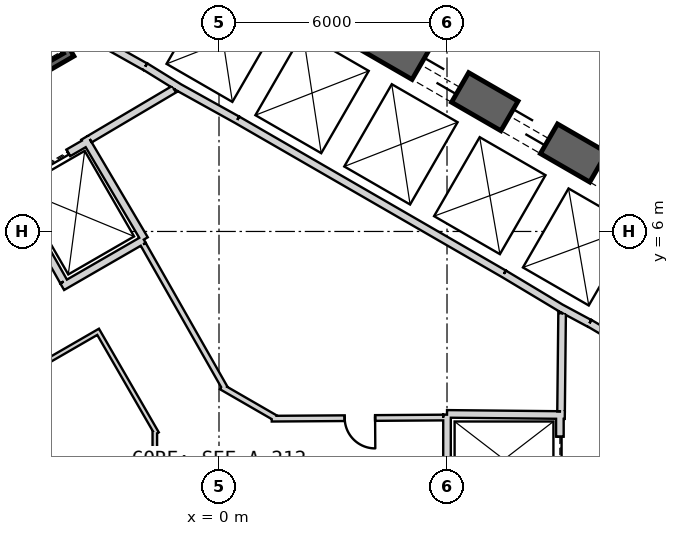
"""IFC4 building model, lengths in metres.
Left out: names, types, materials, properties, quantities, classifications, styles, units other than length and angle.
Written with IfcOpenShell. Run it as: python <this file> out.ifc"""

import sys

from ifc_helpers import new_model, si_unit, direction, frame, frame_2d, origin, place, context, subcontext, project, spatial, rectangle, extrude, element, fill, save


model = new_model("IFC4")
c1 = context("Model", 3, precision=1e-05, world=origin(), true_north=direction((0.0, 1.0)))
c2 = subcontext(c1, "Body", "Model", "MODEL_VIEW")
j1 = project(units=[si_unit("LENGTHUNIT", "METRE"), si_unit("PLANEANGLEUNIT", "RADIAN")], contexts=[c1])
p1 = place(None, origin())
s1 = spatial("IfcSite", under=j1, at=p1, CompositionType="ELEMENT")
p2 = place(p1, origin())
s2 = spatial("IfcBuilding", under=s1, at=p2, CompositionType="ELEMENT")
p3 = place(p2, frame((0.0, 0.0, 70.1)))
s3 = spatial("IfcBuildingStorey", under=s2, at=p3, CompositionType="ELEMENT", Elevation=70.1)
p4 = place(p3, frame((19.475, 2.208, 0.0), z_axis=(0.0, 0.0, 1.0), x_axis=(-0.866028369851, 0.499994862586, 0.0)))
e1 = element("IfcWall", 1, at=p4, inside=s3, PredefinedType="SHEAR", context=c2, shape_type="SweptSolid", body=[
    extrude(rectangle(XDim=31.523, YDim=0.9, at=frame_2d((15.762, 0.0))), origin(), (0.0, 0.0, 1.0), 4.1),
])
p5 = place(p4, frame((7.062, 0.0, 0.0)))
e2 = element("IfcOpeningElement", 2, at=p5, cuts=e1, PredefinedType="OPENING", context=c2, shape_type="SweptSolid", body=[
    extrude(rectangle(XDim=1.2, YDim=2.4, at=frame_2d((0.6, 1.2))), frame((0.0, 0.46, 0.0), z_axis=(0.0, -1.0, 0.0), x_axis=(1.0, 0.0, 0.0)), (0.0, 0.0, 1.0), 0.92),
])
p6 = place(p4, frame((9.762, 0.0, 0.0)))
e3 = element("IfcOpeningElement", 3, at=p6, cuts=e1, PredefinedType="OPENING", context=c2, shape_type="SweptSolid", body=[
    extrude(rectangle(XDim=1.2, YDim=2.4, at=frame_2d((0.6, 1.2))), frame((0.0, 0.46, 0.0), z_axis=(0.0, -1.0, 0.0), x_axis=(1.0, 0.0, 0.0)), (0.0, 0.0, 1.0), 0.92),
])
p7 = place(p4, frame((12.462, 0.0, 0.0)))
e4 = element("IfcOpeningElement", 4, at=p7, cuts=e1, PredefinedType="OPENING", context=c2, shape_type="SweptSolid", body=[
    extrude(rectangle(XDim=1.2, YDim=2.4, at=frame_2d((0.6, 1.2))), frame((0.0, 0.46, 0.0), z_axis=(0.0, -1.0, 0.0), x_axis=(1.0, 0.0, 0.0)), (0.0, 0.0, 1.0), 0.92),
])
p8 = place(p4, frame((15.162, 0.0, 0.0)))
e5 = element("IfcOpeningElement", 5, at=p8, cuts=e1, PredefinedType="OPENING", context=c2, shape_type="SweptSolid", body=[
    extrude(rectangle(XDim=1.2, YDim=2.4, at=frame_2d((0.6, 1.2))), frame((0.0, 0.46, 0.0), z_axis=(0.0, -1.0, 0.0), x_axis=(1.0, 0.0, 0.0)), (0.0, 0.0, 1.0), 0.92),
])
p9 = place(p4, frame((17.862, 0.0, 0.0)))
e6 = element("IfcOpeningElement", 6, at=p9, cuts=e1, PredefinedType="OPENING", context=c2, shape_type="SweptSolid", body=[
    extrude(rectangle(XDim=1.2, YDim=2.4, at=frame_2d((0.6, 1.2))), frame((0.0, 0.46, 0.0), z_axis=(0.0, -1.0, 0.0), x_axis=(1.0, 0.0, 0.0)), (0.0, 0.0, 1.0), 0.92),
])
p10 = place(p4, frame((20.562, 0.0, 0.0)))
e7 = element("IfcOpeningElement", 7, at=p10, cuts=e1, PredefinedType="OPENING", context=c2, shape_type="SweptSolid", body=[
    extrude(rectangle(XDim=1.2, YDim=2.4, at=frame_2d((0.6, 1.2))), frame((0.0, 0.46, 0.0), z_axis=(0.0, -1.0, 0.0), x_axis=(1.0, 0.0, 0.0)), (0.0, 0.0, 1.0), 0.92),
])
p11 = place(p4, frame((23.262, 0.0, 0.0)))
e8 = element("IfcOpeningElement", 8, at=p11, cuts=e1, PredefinedType="OPENING", context=c2, shape_type="SweptSolid", body=[
    extrude(rectangle(XDim=1.2, YDim=2.4, at=frame_2d((0.6, 1.2))), frame((0.0, 0.46, 0.0), z_axis=(0.0, -1.0, 0.0), x_axis=(1.0, 0.0, 0.0)), (0.0, 0.0, 1.0), 0.92),
])
p12 = place(p4, frame((3.612, 0.0, 0.0)))
e9 = element("IfcOpeningElement", 9, at=p12, cuts=e1, PredefinedType="OPENING", context=c2, shape_type="SweptSolid", body=[
    extrude(rectangle(XDim=1.2, YDim=2.4, at=frame_2d((0.6, 1.2))), frame((0.0, 0.46, 0.0), z_axis=(0.0, -1.0, 0.0), x_axis=(1.0, 0.0, 0.0)), (0.0, 0.0, 1.0), 0.92),
])
p13 = place(p4, frame((26.712, 0.0, 0.0)))
e10 = element("IfcOpeningElement", 10, at=p13, cuts=e1, PredefinedType="OPENING", context=c2, shape_type="SweptSolid", body=[
    extrude(rectangle(XDim=1.2, YDim=2.4, at=frame_2d((0.6, 1.2))), frame((0.0, 0.46, 0.0), z_axis=(0.0, -1.0, 0.0), x_axis=(1.0, 0.0, 0.0)), (0.0, 0.0, 1.0), 0.92),
])
p14 = place(p3, frame((7.497, 4.886, 0.0), z_axis=(0.0, 0.0, 1.0), x_axis=(-0.866030989016, 0.499990325971, 0.0)))
e11 = element("IfcWall", 11, at=p14, inside=s3, PredefinedType="PLUMBINGWALL", context=c2, shape_type="SweptSolid", body=[
    extrude(rectangle(XDim=8.1, YDim=0.2, at=frame_2d((4.05, 0.0))), origin(), (0.0, 0.0, 1.0), 3.8),
])
p15 = place(p3, frame((12.073, 2.211, 0.0), z_axis=(0.0, 0.0, 1.0), x_axis=(-0.860438357912, 0.509554542943, 0.0)))
e12 = element("IfcWall", 12, at=p15, inside=s3, PredefinedType="PLUMBINGWALL", context=c2, shape_type="SweptSolid", body=[
    extrude(rectangle(XDim=2.7, YDim=0.2, at=frame_2d((1.35, 0.0))), origin(), (0.0, 0.0, 1.0), 3.8),
])
p16 = place(p3, frame((9.748, 3.583, 0.0), z_axis=(0.0, 0.0, 1.0), x_axis=(-0.880917147855, 0.473270513147, 0.0)))
e13 = element("IfcWall", 13, at=p16, inside=s3, PredefinedType="PLUMBINGWALL", context=c2, shape_type="SweptSolid", body=[
    extrude(rectangle(XDim=0.878, YDim=0.2, at=frame_2d((0.439, 0.0))), origin(), (0.0, 0.0, 1.0), 3.8),
])
p17 = place(p3, frame((9.079, 3.937, 0.0), z_axis=(0.0, 0.0, 1.0), x_axis=(-0.857516281273, 0.51445682749, 0.0)))
e14 = element("IfcWall", 14, at=p17, inside=s3, PredefinedType="PLUMBINGWALL", context=c2, shape_type="SweptSolid", body=[
    extrude(rectangle(XDim=1.845, YDim=0.2, at=frame_2d((0.922, 0.0))), origin(), (0.0, 0.0, 1.0), 3.8),
])
p18 = place(p3, frame((-1.941, 10.339, 0.0), z_axis=(0.0, 0.0, 1.0), x_axis=(0.850216889117, -0.526432561171, 0.0)))
e15 = element("IfcWall", 15, at=p18, inside=s3, PredefinedType="PLUMBINGWALL", context=c2, shape_type="SweptSolid", body=[
    extrude(rectangle(XDim=1.078, YDim=0.2, at=frame_2d((0.539, 0.0))), origin(), (0.0, 0.0, 1.0), 3.8),
])
p19 = place(p3, frame((0.483, 8.936, 0.0), z_axis=(0.0, 0.0, 1.0), x_axis=(-0.874269620932, 0.485440655401, 0.0)))
e16 = element("IfcWall", 16, at=p19, inside=s3, PredefinedType="PLUMBINGWALL", context=c2, shape_type="SweptSolid", body=[
    extrude(rectangle(XDim=1.845, YDim=0.2, at=frame_2d((0.922, 0.0))), origin(), (0.0, 0.0, 1.0), 3.8),
])
p20 = place(p3, frame((-4.296, 11.659, 0.0), z_axis=(0.0, 0.0, 1.0), x_axis=(0.871534483978, -0.490334215854, 0.0)))
e17 = element("IfcWall", 17, at=p20, inside=s3, PredefinedType="PLUMBINGWALL", context=c2, shape_type="SweptSolid", body=[
    extrude(rectangle(XDim=2.7, YDim=0.2, at=frame_2d((1.35, 0.0))), origin(), (0.0, 0.0, 1.0), 3.8),
])
p21 = place(p3, frame((8.97, 1.2, 0.0), z_axis=(0.0, 0.0, 1.0), x_axis=(0.0, -1.0, 0.0)))
e18 = element("IfcWall", 18, at=p21, inside=s3, PredefinedType="PLUMBINGWALL", context=c2, shape_type="SweptSolid", body=[
    extrude(rectangle(XDim=2.4, YDim=0.2, at=frame_2d((1.2, 0.0))), origin(), (0.0, 0.0, 1.0), 3.8),
])
p22 = place(p21, frame((0.6, 0.0, 0.0)))
e19 = element("IfcOpeningElement", 19, at=p22, cuts=e18, PredefinedType="OPENING", context=c2, shape_type="SweptSolid", body=[
    extrude(rectangle(XDim=1.2, YDim=2.4, at=frame_2d((0.6, 1.2))), frame((0.0, 0.11, 0.0), z_axis=(0.0, -1.0, 0.0), x_axis=(1.0, 0.0, 0.0)), (0.0, 0.0, 1.0), 0.22),
])
p23 = place(p3, frame((6.0, 1.2, 0.0), z_axis=(0.0, 0.0, 1.0), x_axis=(0.999949988, -0.010001074852, 0.0)))
e20 = element("IfcWall", 20, at=p23, inside=s3, PredefinedType="PLUMBINGWALL", context=c2, shape_type="SweptSolid", body=[
    extrude(rectangle(XDim=3.1, YDim=0.2, at=frame_2d((1.55, 0.0))), origin(), (0.0, 0.0, 1.0), 3.8),
])
p24 = place(p3, frame((6.0, -1.1, 0.0), z_axis=(0.0, 0.0, 1.0), x_axis=(0.0, 1.0, 0.0)))
e21 = element("IfcWall", 21, at=p24, inside=s3, PredefinedType="PLUMBINGWALL", context=c2, shape_type="SweptSolid", body=[
    extrude(rectangle(XDim=2.28, YDim=0.2, at=frame_2d((1.14, 0.0))), origin(), (0.0, 0.0, 1.0), 3.8),
])
p25 = place(p3, frame((-7.854, 17.405, -0.3), z_axis=(0.0, 0.0, 1.0), x_axis=(0.499997992926, -0.866026562566, 0.0)))
e22 = element("IfcWall", 22, at=p25, inside=s3, PredefinedType="SHEAR", context=c2, shape_type="SweptSolid", body=[
    extrude(rectangle(XDim=7.9, YDim=0.2, at=frame_2d((3.95, 0.0))), origin(), (0.0, 0.0, 1.0), 4.1),
])
p26 = place(p3, frame((-7.159, 8.8, -0.3), z_axis=(0.0, 0.0, 1.0), x_axis=(0.866047807691, 0.499961193289, 0.0)))
e23 = element("IfcWall", 23, at=p26, inside=s3, PredefinedType="SHEAR", context=c2, shape_type="SweptSolid", body=[
    extrude(rectangle(XDim=3.6, YDim=0.2, at=frame_2d((1.8, 0.0))), origin(), (0.0, 0.0, 1.0), 4.1),
])
p27 = place(p26, frame((1.25, 0.0, 0.3)))
e24 = element("IfcOpeningElement", 24, at=p27, cuts=e23, PredefinedType="OPENING", context=c2, shape_type="SweptSolid", body=[
    extrude(rectangle(XDim=1.1, YDim=2.1, at=frame_2d((0.55, 1.05))), frame((0.0, 0.11, 0.0), z_axis=(0.0, -1.0, 0.0), x_axis=(1.0, 0.0, 0.0)), (0.0, 0.0, 1.0), 0.22),
])
p28 = place(p3, frame((-5.524, 7.168, 0.0), z_axis=(0.0, 0.0, 1.0), x_axis=(0.866024647952, 0.500001309137, 0.0)))
e25 = element("IfcWall", 25, at=p28, inside=s3, PredefinedType="PLUMBINGWALL", context=c2, shape_type="SweptSolid", body=[
    extrude(rectangle(XDim=2.4, YDim=0.2, at=frame_2d((1.2, 0.0))), origin(), (0.0, 0.0, 1.0), 3.8),
])
p29 = place(p28, frame((0.6, 0.0, 0.0)))
e26 = element("IfcOpeningElement", 26, at=p29, cuts=e25, PredefinedType="OPENING", context=c2, shape_type="SweptSolid", body=[
    extrude(rectangle(XDim=1.2, YDim=2.4, at=frame_2d((0.6, 1.2))), frame((0.0, 0.11, 0.0), z_axis=(0.0, -1.0, 0.0), x_axis=(1.0, 0.0, 0.0)), (0.0, 0.0, 1.0), 0.22),
])
p30 = place(p3, frame((-3.538, 8.465, 0.0), z_axis=(0.0, 0.0, 1.0), x_axis=(0.508647062354, -0.860975125052, 0.0)))
e27 = element("IfcWall", 27, at=p30, inside=s3, PredefinedType="PLUMBINGWALL", context=c2, shape_type="SweptSolid", body=[
    extrude(rectangle(XDim=3.1, YDim=0.2, at=frame_2d((1.55, 0.0))), origin(), (0.0, 0.0, 1.0), 3.8),
])
p31 = place(p3, frame((-1.979, 5.786, 0.0), z_axis=(0.0, 0.0, 1.0), x_axis=(-0.866016689309, -0.500015093611, 0.0)))
e28 = element("IfcWall", 28, at=p31, inside=s3, PredefinedType="PLUMBINGWALL", context=c2, shape_type="SweptSolid", body=[
    extrude(rectangle(XDim=2.479, YDim=0.2, at=frame_2d((1.24, 0.0))), origin(), (0.0, 0.0, 1.0), 3.8),
])
p32 = place(p3, frame((-5.562, 7.296, 0.0), z_axis=(0.0, 0.0, 1.0), x_axis=(0.49134651263, -0.870964180966, 0.0)))
e29 = element("IfcWall", 29, at=p32, inside=s3, PredefinedType="PLUMBINGWALL", context=c2, shape_type="SweptSolid", body=[
    extrude(rectangle(XDim=3.0, YDim=0.2, at=frame_2d((1.5, 0.0))), origin(), (0.0, 0.0, 1.0), 3.8),
])
p33 = place(p3, frame((9.001, 1.27, 0.0), z_axis=(0.0, 0.0, 1.0), x_axis=(0.010784614026, 0.999941844359, 0.0)))
e30 = element("IfcWall", 30, at=p33, inside=s3, PredefinedType="PARTITIONING", context=c2, shape_type="SweptSolid", body=[
    extrude(rectangle(XDim=2.581, YDim=0.2, at=frame_2d((1.291, 0.0))), origin(), (0.0, 0.0, 1.0), 3.8),
])
p34 = place(p3, frame((-1.18, 9.744, 0.0), z_axis=(0.0, 0.0, 1.0), x_axis=(-0.860615607571, -0.509255118781, 0.0)))
e31 = element("IfcWall", 31, at=p34, inside=s3, PredefinedType="PARTITIONING", context=c2, shape_type="SweptSolid", body=[
    extrude(rectangle(XDim=2.581, YDim=0.2, at=frame_2d((1.29, 0.0))), origin(), (0.0, 0.0, 1.0), 3.8),
])
p35 = place(p3, frame((1.388, 1.074, 0.0), z_axis=(0.0, 0.0, 1.0), x_axis=(0.99997856967, 0.006546770205, 0.0)))
e32 = element("IfcWall", 32, at=p35, inside=s3, PredefinedType="PLUMBINGWALL", context=c2, shape_type="SweptSolid", body=[
    extrude(rectangle(XDim=4.512, YDim=0.15, at=frame_2d((2.256, 0.0))), origin(), (0.0, 0.0, 1.0), 3.8),
])
p36 = place(p35, frame((1.92, 0.0, 0.0)))
e33 = element("IfcOpeningElement", 33, at=p36, cuts=e32, PredefinedType="OPENING", context=c2, shape_type="SweptSolid", body=[
    extrude(rectangle(XDim=0.8, YDim=2.1, at=frame_2d((0.4, 1.05))), frame((0.0, 0.085, 0.0), z_axis=(0.0, -1.0, 0.0), x_axis=(1.0, 0.0, 0.0)), (0.0, 0.0, 1.0), 0.17),
])
p37 = place(p3, frame((0.062, 1.914, 0.0), z_axis=(0.0, 0.0, 1.0), x_axis=(0.866018462269, -0.500012022864, 0.0)))
e34 = element("IfcWall", 34, at=p37, inside=s3, PredefinedType="PLUMBINGWALL", context=c2, shape_type="SweptSolid", body=[
    extrude(rectangle(XDim=1.654, YDim=0.15, at=frame_2d((0.827, 0.0))), origin(), (0.0, 0.0, 1.0), 3.8),
])
p38 = place(p3, frame((-1.994, 5.661, 0.0), z_axis=(0.0, 0.0, 1.0), x_axis=(0.494341211302, -0.869267948798, 0.0)))
e35 = element("IfcWall", 35, at=p38, inside=s3, PredefinedType="PLUMBINGWALL", context=c2, shape_type="SweptSolid", body=[
    extrude(rectangle(XDim=4.361, YDim=0.15, at=frame_2d((2.18, 0.0))), origin(), (0.0, 0.0, 1.0), 3.8),
])
p39 = place(p3, frame((-3.129, 3.39, 0.0), z_axis=(0.0, 0.0, 1.0), x_axis=(-0.866053003207, -0.499952193351, 0.0)))
e36 = element("IfcWall", 36, at=p39, inside=s3, PredefinedType="PARTITIONING", context=c2, shape_type="SweptSolid", body=[
    extrude(rectangle(XDim=1.625, YDim=0.12, at=frame_2d((0.812, 0.0))), origin(), (0.0, 0.0, 1.0), 3.8),
])
p40 = place(p3, frame((-1.637, 0.685, 0.0), z_axis=(0.0, 0.0, 1.0), x_axis=(-0.500006252586, 0.866021793822, 0.0)))
e37 = element("IfcWall", 37, at=p40, inside=s3, PredefinedType="PARTITIONING", context=c2, shape_type="SweptSolid", body=[
    extrude(rectangle(XDim=3.028, YDim=0.12, at=frame_2d((1.514, 0.0))), origin(), (0.0, 0.0, 1.0), 3.8),
])
p41 = place(p3, frame((-1.689, -0.879, 0.0), z_axis=(0.0, 0.0, 1.0), x_axis=(0.0, 1.0, 0.0)))
e38 = element("IfcWall", 38, at=p41, inside=s3, PredefinedType="PARTITIONING", context=c2, shape_type="SweptSolid", body=[
    extrude(rectangle(XDim=1.635, YDim=0.12, at=frame_2d((0.818, 0.0))), origin(), (0.0, 0.0, 1.0), 3.8),
])
p42 = place(p3, frame((17.023, 9.224, 0.0), z_axis=(0.0, 0.0, 1.0), x_axis=(-0.866024925705, 0.500000828058, 0.0)))
e39 = element("IfcWall", 39, at=p42, inside=s3, PredefinedType="PARTITIONING", context=c2, shape_type="SweptSolid", body=[
    extrude(rectangle(XDim=26.647, YDim=0.2, at=frame_2d((13.323, 0.0))), origin(), (0.0, 0.0, 1.0), 2.98),
])
p43 = place(p42, frame((12.823, 0.0, 0.0)))
e40 = element("IfcOpeningElement", 40, at=p43, cuts=e39, PredefinedType="OPENING", context=c2, shape_type="SweptSolid", body=[
    extrude(rectangle(XDim=1.0, YDim=2.1, at=frame_2d((0.5, 1.05))), frame((0.0, 0.11, 0.0), z_axis=(0.0, -1.0, 0.0), x_axis=(1.0, 0.0, 0.0)), (0.0, 0.0, 1.0), 0.22),
])
p44 = place(p22, origin())
e41 = element("IfcDoor", 41, at=p44, inside=s3, OperationType="SLIDING_TO_LEFT", PredefinedType="USERDEFINED", context=c2, shape_type="SweptSolid", body=[
    extrude(rectangle(XDim=1.2, YDim=2.4, at=frame_2d((0.6, 1.2))), frame((0.0, 0.025, 0.0), z_axis=(0.0, -1.0, 0.0), x_axis=(1.0, 0.0, 0.0)), (0.0, 0.0, 1.0), 0.05),
])
fill(e19, e41)
p45 = place(p29, origin())
e42 = element("IfcDoor", 42, at=p45, inside=s3, OperationType="SLIDING_TO_LEFT", PredefinedType="USERDEFINED", context=c2, shape_type="SweptSolid", body=[
    extrude(rectangle(XDim=1.2, YDim=2.4, at=frame_2d((0.6, 1.2))), frame((0.0, 0.025, 0.0), z_axis=(0.0, -1.0, 0.0), x_axis=(1.0, 0.0, 0.0)), (0.0, 0.0, 1.0), 0.05),
])
fill(e26, e42)
p46 = place(p36, origin())
e43 = element("IfcDoor", 43, at=p46, inside=s3, OperationType="SINGLE_SWING_LEFT", PredefinedType="USERDEFINED", context=c2, shape_type="SweptSolid", body=[
    extrude(rectangle(XDim=0.8, YDim=2.1, at=frame_2d((0.4, 1.05))), frame((0.0, 0.025, 0.0), z_axis=(0.0, -1.0, 0.0), x_axis=(1.0, 0.0, 0.0)), (0.0, 0.0, 1.0), 0.05),
])
fill(e33, e43)
p47 = place(p6, origin())
e44 = element("IfcDoor", 44, at=p47, inside=s3, OperationType="SLIDING_TO_LEFT", PredefinedType="USERDEFINED", context=c2, shape_type="SweptSolid", body=[
    extrude(rectangle(XDim=1.2, YDim=2.4, at=frame_2d((0.6, 1.2))), frame((0.0, 0.025, 0.0), z_axis=(0.0, -1.0, 0.0), x_axis=(1.0, 0.0, 0.0)), (0.0, 0.0, 1.0), 0.05),
])
fill(e3, e44)
p48 = place(p7, origin())
e45 = element("IfcDoor", 45, at=p48, inside=s3, OperationType="SLIDING_TO_LEFT", PredefinedType="USERDEFINED", context=c2, shape_type="SweptSolid", body=[
    extrude(rectangle(XDim=1.2, YDim=2.4, at=frame_2d((0.6, 1.2))), frame((0.0, 0.025, 0.0), z_axis=(0.0, -1.0, 0.0), x_axis=(1.0, 0.0, 0.0)), (0.0, 0.0, 1.0), 0.05),
])
fill(e4, e45)
p49 = place(p8, origin())
e46 = element("IfcDoor", 46, at=p49, inside=s3, OperationType="SLIDING_TO_LEFT", PredefinedType="USERDEFINED", context=c2, shape_type="SweptSolid", body=[
    extrude(rectangle(XDim=1.2, YDim=2.4, at=frame_2d((0.6, 1.2))), frame((0.0, 0.025, 0.0), z_axis=(0.0, -1.0, 0.0), x_axis=(1.0, 0.0, 0.0)), (0.0, 0.0, 1.0), 0.05),
])
fill(e5, e46)
save(model, sys.argv[1])
